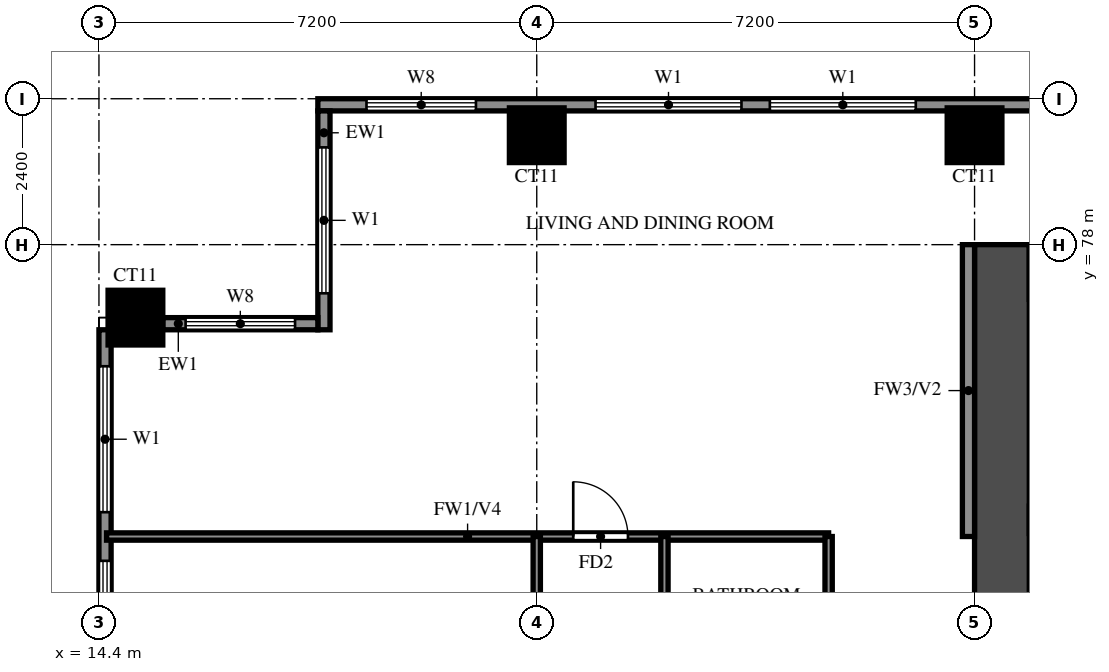
"""IFC4 building model, lengths in metres.
Left out: names, types, materials, properties, quantities, classifications, styles, units other than length and angle.
Written with IfcOpenShell. Run it as: python <this file> out.ifc"""

import sys

from ifc_helpers import new_model, si_unit, direction, frame, frame_2d, origin, origin_2d, place, context, subcontext, project, spatial, rectangle, extrude, source, transform, mapped, element, fill, save


model = new_model("IFC4")
c1 = context("Model", 3, precision=1e-05, world=origin(), true_north=direction((0.0, 1.0)))
c2 = subcontext(c1, "Body", "Model", "MODEL_VIEW")
j1 = project(units=[si_unit("LENGTHUNIT", "METRE"), si_unit("PLANEANGLEUNIT", "RADIAN")], contexts=[c1])
p1 = place(None, origin())
s1 = spatial("IfcSite", under=j1, at=p1, CompositionType="ELEMENT")
p2 = place(p1, origin())
s2 = spatial("IfcBuilding", under=s1, at=p2, CompositionType="ELEMENT")
p3 = place(p2, frame((0.0, 0.0, 97.0)))
s3 = spatial("IfcBuildingStorey", under=s2, at=p3, CompositionType="ELEMENT", Elevation=97.0)
m1 = source(origin(), c2, "Body", "SweptSolid", [
    extrude(rectangle(XDim=0.9, YDim=0.9, at=origin_2d()), origin(), (0.0, 0.0, 1.0), 3.18),
])
for number, where, z_axis, x_axis in (
    (1, (15.0, 76.8, 0.0), (0.0, 0.0, 1.0), (1.0, 0.0, 0.0)),
    (2, (21.6, 79.8, 0.0), (0.0, 0.0, 1.0), (1.0, 0.0, 0.0)),
    (3, (28.8, 79.8, 0.0), (0.0, 0.0, 1.0), (1.0, 0.0, 0.0)),
):
    element("IfcColumn", number, at=place(p3, frame(where, z_axis=z_axis, x_axis=x_axis)), inside=s3, PredefinedType="COLUMN", context=c2, shape_type="MappedRepresentation", body=[
        mapped(m1, transform((0.0, 0.0, 0.0))),
    ])
p4 = place(p3, frame((29.25, 66.0, 0.0), z_axis=(0.0, 0.0, 1.0), x_axis=(0.0, 1.0, 0.0)))
e4 = element("IfcWall", 4, at=p4, inside=s3, PredefinedType="SHEAR", context=c2, shape_type="SweptSolid", body=[
    extrude(rectangle(XDim=12.0, YDim=0.9, at=frame_2d((6.0, 0.0))), origin(), (0.0, 0.0, 1.0), 3.18),
])
p5 = place(p3, frame((29.7, 73.475, 0.0), z_axis=(0.0, 0.0, 1.0), x_axis=(1.0, 0.0, 0.0)))
e5 = element("IfcWall", 5, at=p5, inside=s3, PredefinedType="SHEAR", context=c2, shape_type="SweptSolid", body=[
    extrude(rectangle(XDim=3.175, YDim=0.45, at=frame_2d((1.587, 0.0))), origin(), (0.0, 0.0, 1.0), 3.18),
])
p6 = place(p3, frame((82.6, 80.3, 0.0), z_axis=(0.0, 0.0, 1.0), x_axis=(-1.0, 0.0, 0.0)))
e6 = element("IfcWall", 6, at=p6, inside=s3, PredefinedType="SOLIDWALL", context=c2, shape_type="SweptSolid", body=[
    extrude(rectangle(XDim=64.6, YDim=0.2, at=frame_2d((32.3, 0.0))), origin(), (0.0, 0.0, 1.0), 3.18),
])
p7 = place(p6, frame((4.3, 0.0, 0.0)))
e7 = element("IfcOpeningElement", 7, at=p7, cuts=e6, PredefinedType="OPENING", context=c2, shape_type="SweptSolid", body=[
    extrude(rectangle(XDim=1.8, YDim=2.4, at=frame_2d((0.9, 1.2))), frame((0.0, 0.11, 0.0), z_axis=(0.0, -1.0, 0.0), x_axis=(1.0, 0.0, 0.0)), (0.0, 0.0, 1.0), 0.22),
])
p8 = place(p6, frame((54.767, 0.0, 0.6)))
e8 = element("IfcOpeningElement", 8, at=p8, cuts=e6, PredefinedType="OPENING", context=c2, shape_type="SweptSolid", body=[
    extrude(rectangle(XDim=2.4, YDim=2.4, at=frame_2d((1.2, 1.2))), frame((0.0, 0.11, 0.0), z_axis=(0.0, -1.0, 0.0), x_axis=(1.0, 0.0, 0.0)), (0.0, 0.0, 1.0), 0.22),
])
p9 = place(p6, frame((57.633, 0.0, 0.6)))
e9 = element("IfcOpeningElement", 9, at=p9, cuts=e6, PredefinedType="OPENING", context=c2, shape_type="SweptSolid", body=[
    extrude(rectangle(XDim=2.4, YDim=2.4, at=frame_2d((1.2, 1.2))), frame((0.0, 0.11, 0.0), z_axis=(0.0, -1.0, 0.0), x_axis=(1.0, 0.0, 0.0)), (0.0, 0.0, 1.0), 0.22),
])
p10 = place(p6, frame((62.0, 0.0, 0.6)))
e10 = element("IfcOpeningElement", 10, at=p10, cuts=e6, PredefinedType="OPENING", context=c2, shape_type="SweptSolid", body=[
    extrude(rectangle(XDim=1.8, YDim=2.4, at=frame_2d((0.9, 1.2))), frame((0.0, 0.11, 0.0), z_axis=(0.0, -1.0, 0.0), x_axis=(1.0, 0.0, 0.0)), (0.0, 0.0, 1.0), 0.22),
])
p11 = place(p6, frame((1.7, 0.0, 0.6)))
e11 = element("IfcOpeningElement", 11, at=p11, cuts=e6, PredefinedType="OPENING", context=c2, shape_type="SweptSolid", body=[
    extrude(rectangle(XDim=1.2, YDim=2.4, at=frame_2d((0.6, 1.2))), frame((0.0, 0.11, 0.0), z_axis=(0.0, -1.0, 0.0), x_axis=(1.0, 0.0, 0.0)), (0.0, 0.0, 1.0), 0.22),
])
p12 = place(p6, frame((6.55, 0.0, 0.6)))
e12 = element("IfcOpeningElement", 12, at=p12, cuts=e6, PredefinedType="OPENING", context=c2, shape_type="SweptSolid", body=[
    extrude(rectangle(XDim=0.9, YDim=2.4, at=frame_2d((0.45, 1.2))), frame((0.0, 0.11, 0.0), z_axis=(0.0, -1.0, 0.0), x_axis=(1.0, 0.0, 0.0)), (0.0, 0.0, 1.0), 0.22),
])
p13 = place(p6, frame((8.3, 0.0, 0.6)))
e13 = element("IfcOpeningElement", 13, at=p13, cuts=e6, PredefinedType="OPENING", context=c2, shape_type="SweptSolid", body=[
    extrude(rectangle(XDim=1.8, YDim=2.4, at=frame_2d((0.9, 1.2))), frame((0.0, 0.11, 0.0), z_axis=(0.0, -1.0, 0.0), x_axis=(1.0, 0.0, 0.0)), (0.0, 0.0, 1.0), 0.22),
])
p14 = place(p3, frame((18.1, 80.2, 0.0), z_axis=(0.0, 0.0, 1.0), x_axis=(0.0, -1.0, 0.0)))
e14 = element("IfcWall", 14, at=p14, inside=s3, PredefinedType="SOLIDWALL", context=c2, shape_type="SweptSolid", body=[
    extrude(rectangle(XDim=3.6, YDim=0.2, at=frame_2d((1.8, 0.0))), origin(), (0.0, 0.0, 1.0), 3.18),
])
p15 = place(p14, frame((0.6, 0.0, 0.6)))
e15 = element("IfcOpeningElement", 15, at=p15, cuts=e14, PredefinedType="OPENING", context=c2, shape_type="SweptSolid", body=[
    extrude(rectangle(XDim=2.4, YDim=2.4, at=frame_2d((1.2, 1.2))), frame((0.0, 0.11, 0.0), z_axis=(0.0, -1.0, 0.0), x_axis=(1.0, 0.0, 0.0)), (0.0, 0.0, 1.0), 0.22),
])
p16 = place(p3, frame((18.0, 76.7, 0.0), z_axis=(0.0, 0.0, 1.0), x_axis=(-1.0, 0.0, 0.0)))
e16 = element("IfcWall", 16, at=p16, inside=s3, PredefinedType="SOLIDWALL", context=c2, shape_type="SweptSolid", body=[
    extrude(rectangle(XDim=2.55, YDim=0.2, at=frame_2d((1.275, 0.0))), origin(), (0.0, 0.0, 1.0), 3.18),
])
p17 = place(p16, frame((0.375, 0.0, 0.6)))
e17 = element("IfcOpeningElement", 17, at=p17, cuts=e16, PredefinedType="OPENING", context=c2, shape_type="SweptSolid", body=[
    extrude(rectangle(XDim=1.8, YDim=2.4, at=frame_2d((0.9, 1.2))), frame((0.0, 0.11, 0.0), z_axis=(0.0, -1.0, 0.0), x_axis=(1.0, 0.0, 0.0)), (0.0, 0.0, 1.0), 0.22),
])
p18 = place(p3, frame((14.5, 76.6, 0.0), z_axis=(0.0, 0.0, 1.0), x_axis=(0.0, -1.0, 0.0)))
e18 = element("IfcWall", 18, at=p18, inside=s3, PredefinedType="SOLIDWALL", context=c2, shape_type="SweptSolid", body=[
    extrude(rectangle(XDim=39.4, YDim=0.2, at=frame_2d((19.7, 0.0))), origin(), (0.0, 0.0, 1.0), 3.18),
])
p19 = place(p18, frame((25.9, 0.0, 0.0)))
e19 = element("IfcOpeningElement", 19, at=p19, cuts=e18, PredefinedType="OPENING", context=c2, shape_type="SweptSolid", body=[
    extrude(rectangle(XDim=1.8, YDim=2.4, at=frame_2d((0.9, 1.2))), frame((0.0, 0.11, 0.0), z_axis=(0.0, -1.0, 0.0), x_axis=(1.0, 0.0, 0.0)), (0.0, 0.0, 1.0), 0.22),
])
p20 = place(p18, frame((29.25, 0.0, 0.6)))
e20 = element("IfcOpeningElement", 20, at=p20, cuts=e18, PredefinedType="OPENING", context=c2, shape_type="SweptSolid", body=[
    extrude(rectangle(XDim=0.9, YDim=2.4, at=frame_2d((0.45, 1.2))), frame((0.0, 0.11, 0.0), z_axis=(0.0, -1.0, 0.0), x_axis=(1.0, 0.0, 0.0)), (0.0, 0.0, 1.0), 0.22),
])
p21 = place(p18, frame((32.0, 0.0, 0.6)))
e21 = element("IfcOpeningElement", 21, at=p21, cuts=e18, PredefinedType="OPENING", context=c2, shape_type="SweptSolid", body=[
    extrude(rectangle(XDim=2.4, YDim=2.4, at=frame_2d((1.2, 1.2))), frame((0.0, 0.11, 0.0), z_axis=(0.0, -1.0, 0.0), x_axis=(1.0, 0.0, 0.0)), (0.0, 0.0, 1.0), 0.22),
])
p22 = place(p18, frame((36.8, 0.0, 0.6)))
e22 = element("IfcOpeningElement", 22, at=p22, cuts=e18, PredefinedType="OPENING", context=c2, shape_type="SweptSolid", body=[
    extrude(rectangle(XDim=1.8, YDim=2.4, at=frame_2d((0.9, 1.2))), frame((0.0, 0.11, 0.0), z_axis=(0.0, -1.0, 0.0), x_axis=(1.0, 0.0, 0.0)), (0.0, 0.0, 1.0), 0.22),
])
p23 = place(p18, frame((22.2, 0.0, 0.6)))
e23 = element("IfcOpeningElement", 23, at=p23, cuts=e18, PredefinedType="OPENING", context=c2, shape_type="SweptSolid", body=[
    extrude(rectangle(XDim=1.2, YDim=2.4, at=frame_2d((0.6, 1.2))), frame((0.0, 0.11, 0.0), z_axis=(0.0, -1.0, 0.0), x_axis=(1.0, 0.0, 0.0)), (0.0, 0.0, 1.0), 0.22),
])
p24 = place(p18, frame((24.55, 0.0, 0.6)))
e24 = element("IfcOpeningElement", 24, at=p24, cuts=e18, PredefinedType="OPENING", context=c2, shape_type="SweptSolid", body=[
    extrude(rectangle(XDim=0.9, YDim=2.4, at=frame_2d((0.45, 1.2))), frame((0.0, 0.11, 0.0), z_axis=(0.0, -1.0, 0.0), x_axis=(1.0, 0.0, 0.0)), (0.0, 0.0, 1.0), 0.22),
])
p25 = place(p18, frame((18.2, 0.0, 0.6)))
e25 = element("IfcOpeningElement", 25, at=p25, cuts=e18, PredefinedType="OPENING", context=c2, shape_type="SweptSolid", body=[
    extrude(rectangle(XDim=2.4, YDim=2.4, at=frame_2d((1.2, 1.2))), frame((0.0, 0.11, 0.0), z_axis=(0.0, -1.0, 0.0), x_axis=(1.0, 0.0, 0.0)), (0.0, 0.0, 1.0), 0.22),
])
p26 = place(p18, frame((15.3, 0.0, 0.6)))
e26 = element("IfcOpeningElement", 26, at=p26, cuts=e18, PredefinedType="OPENING", context=c2, shape_type="SweptSolid", body=[
    extrude(rectangle(XDim=1.8, YDim=2.4, at=frame_2d((0.9, 1.2))), frame((0.0, 0.11, 0.0), z_axis=(0.0, -1.0, 0.0), x_axis=(1.0, 0.0, 0.0)), (0.0, 0.0, 1.0), 0.22),
])
p27 = place(p18, frame((11.75, 0.0, 1.5)))
e27 = element("IfcOpeningElement", 27, at=p27, cuts=e18, PredefinedType="OPENING", context=c2, shape_type="SweptSolid", body=[
    extrude(rectangle(XDim=0.9, YDim=0.9, at=frame_2d((0.45, 0.45))), frame((0.0, 0.11, 0.0), z_axis=(0.0, -1.0, 0.0), x_axis=(1.0, 0.0, 0.0)), (0.0, 0.0, 1.0), 0.22),
])
p28 = place(p18, frame((7.8, 0.0, 0.6)))
e28 = element("IfcOpeningElement", 28, at=p28, cuts=e18, PredefinedType="OPENING", context=c2, shape_type="SweptSolid", body=[
    extrude(rectangle(XDim=2.4, YDim=2.4, at=frame_2d((1.2, 1.2))), frame((0.0, 0.11, 0.0), z_axis=(0.0, -1.0, 0.0), x_axis=(1.0, 0.0, 0.0)), (0.0, 0.0, 1.0), 0.22),
])
p29 = place(p18, frame((3.8, 0.0, 0.6)))
e29 = element("IfcOpeningElement", 29, at=p29, cuts=e18, PredefinedType="OPENING", context=c2, shape_type="SweptSolid", body=[
    extrude(rectangle(XDim=2.4, YDim=2.4, at=frame_2d((1.2, 1.2))), frame((0.0, 0.11, 0.0), z_axis=(0.0, -1.0, 0.0), x_axis=(1.0, 0.0, 0.0)), (0.0, 0.0, 1.0), 0.22),
])
p30 = place(p18, frame((0.6, 0.0, 0.6)))
e30 = element("IfcOpeningElement", 30, at=p30, cuts=e18, PredefinedType="OPENING", context=c2, shape_type="SweptSolid", body=[
    extrude(rectangle(XDim=2.4, YDim=2.4, at=frame_2d((1.2, 1.2))), frame((0.0, 0.11, 0.0), z_axis=(0.0, -1.0, 0.0), x_axis=(1.0, 0.0, 0.0)), (0.0, 0.0, 1.0), 0.22),
])
p31 = place(p3, frame((28.7, 73.2, 0.0), z_axis=(0.0, 0.0, 1.0), x_axis=(0.0, 1.0, 0.0)))
e31 = element("IfcWall", 31, at=p31, inside=s3, PredefinedType="SOLIDWALL", context=c2, shape_type="SweptSolid", body=[
    extrude(rectangle(XDim=4.8, YDim=0.2, at=frame_2d((2.4, 0.0))), origin(), (0.0, 0.0, 1.0), 3.18),
])
p32 = place(p3, frame((14.525, 73.2, 0.0), z_axis=(0.0, 0.0, 1.0), x_axis=(1.0, 0.0, 0.0)))
e32 = element("IfcWall", 32, at=p32, inside=s3, PredefinedType="PARTITIONING", context=c2, shape_type="SweptSolid", body=[
    extrude(rectangle(XDim=11.875, YDim=0.12, at=frame_2d((5.938, 0.0))), origin(), (0.0, 0.0, 1.0), 2.28),
])
p33 = place(p32, frame((7.675, 0.0, 0.0)))
e33 = element("IfcOpeningElement", 33, at=p33, cuts=e32, PredefinedType="OPENING", context=c2, shape_type="SweptSolid", body=[
    extrude(rectangle(XDim=0.9, YDim=2.1, at=frame_2d((0.45, 1.05))), frame((0.0, 0.07, 0.0), z_axis=(0.0, -1.0, 0.0), x_axis=(1.0, 0.0, 0.0)), (0.0, 0.0, 1.0), 0.14),
])
p34 = place(p3, frame((21.6, 66.0, 0.0), z_axis=(0.0, 0.0, 1.0), x_axis=(0.0, 1.0, 0.0)))
e34 = element("IfcWall", 34, at=p34, inside=s3, PredefinedType="PARTITIONING", context=c2, shape_type="SweptSolid", body=[
    extrude(rectangle(XDim=7.2, YDim=0.12, at=frame_2d((3.6, 0.0))), origin(), (0.0, 0.0, 1.0), 3.18),
])
p35 = place(p34, frame((1.35, 0.0, 0.0)))
e35 = element("IfcOpeningElement", 35, at=p35, cuts=e34, PredefinedType="OPENING", context=c2, shape_type="SweptSolid", body=[
    extrude(rectangle(XDim=0.9, YDim=2.1, at=frame_2d((0.45, 1.05))), frame((0.0, 0.07, 0.0), z_axis=(0.0, -1.0, 0.0), x_axis=(1.0, 0.0, 0.0)), (0.0, 0.0, 1.0), 0.14),
])
p36 = place(p34, frame((4.95, 0.0, 0.0)))
e36 = element("IfcOpeningElement", 36, at=p36, cuts=e34, PredefinedType="OPENING", context=c2, shape_type="SweptSolid", body=[
    extrude(rectangle(XDim=0.9, YDim=2.1, at=frame_2d((0.45, 1.05))), frame((0.0, 0.07, 0.0), z_axis=(0.0, -1.0, 0.0), x_axis=(1.0, 0.0, 0.0)), (0.0, 0.0, 1.0), 0.14),
])
p37 = place(p3, frame((23.7, 61.2, 0.0), z_axis=(0.0, 0.0, 1.0), x_axis=(0.0, 1.0, 0.0)))
e37 = element("IfcWall", 37, at=p37, inside=s3, PredefinedType="PARTITIONING", context=c2, shape_type="SweptSolid", body=[
    extrude(rectangle(XDim=12.0, YDim=0.12, at=frame_2d((6.0, 0.0))), origin(), (0.0, 0.0, 1.0), 3.18),
])
p38 = place(p37, frame((1.875, 0.0, 0.0)))
e38 = element("IfcOpeningElement", 38, at=p38, cuts=e37, PredefinedType="OPENING", context=c2, shape_type="SweptSolid", body=[
    extrude(rectangle(XDim=0.9, YDim=2.1, at=frame_2d((0.45, 1.05))), frame((0.0, 0.07, 0.0), z_axis=(0.0, -1.0, 0.0), x_axis=(1.0, 0.0, 0.0)), (0.0, 0.0, 1.0), 0.14),
])
p39 = place(p37, frame((5.875, 0.0, 0.0)))
e39 = element("IfcOpeningElement", 39, at=p39, cuts=e37, PredefinedType="OPENING", context=c2, shape_type="SweptSolid", body=[
    extrude(rectangle(XDim=0.9, YDim=2.1, at=frame_2d((0.45, 1.05))), frame((0.0, 0.07, 0.0), z_axis=(0.0, -1.0, 0.0), x_axis=(1.0, 0.0, 0.0)), (0.0, 0.0, 1.0), 0.14),
])
p40 = place(p37, frame((9.6, 0.0, 0.0)))
e40 = element("IfcOpeningElement", 40, at=p40, cuts=e37, PredefinedType="OPENING", context=c2, shape_type="SweptSolid", body=[
    extrude(rectangle(XDim=0.8, YDim=2.1, at=frame_2d((0.4, 1.05))), frame((0.0, 0.07, 0.0), z_axis=(0.0, -1.0, 0.0), x_axis=(1.0, 0.0, 0.0)), (0.0, 0.0, 1.0), 0.14),
])
p41 = place(p3, frame((26.4, 69.2, 0.0), z_axis=(0.0, 0.0, 1.0), x_axis=(0.0, 1.0, 0.0)))
e41 = element("IfcWall", 41, at=p41, inside=s3, PredefinedType="PARTITIONING", context=c2, shape_type="SweptSolid", body=[
    extrude(rectangle(XDim=4.0, YDim=0.12, at=frame_2d((2.0, 0.0))), origin(), (0.0, 0.0, 1.0), 3.18),
])
p42 = place(p8, origin())
e42 = element("IfcWindow", 42, at=p42, inside=s3, PartitioningType="DOUBLE_PANEL_VERTICAL", PredefinedType="WINDOW", context=c2, shape_type="SweptSolid", body=[
    extrude(rectangle(XDim=2.4, YDim=2.4, at=frame_2d((1.2, 1.2))), frame((0.0, 0.03, 0.0), z_axis=(0.0, -1.0, 0.0), x_axis=(1.0, 0.0, 0.0)), (0.0, 0.0, 1.0), 0.06),
])
fill(e8, e42)
p43 = place(p9, origin())
e43 = element("IfcWindow", 43, at=p43, inside=s3, PartitioningType="DOUBLE_PANEL_VERTICAL", PredefinedType="WINDOW", context=c2, shape_type="SweptSolid", body=[
    extrude(rectangle(XDim=2.4, YDim=2.4, at=frame_2d((1.2, 1.2))), frame((0.0, 0.03, 0.0), z_axis=(0.0, -1.0, 0.0), x_axis=(1.0, 0.0, 0.0)), (0.0, 0.0, 1.0), 0.06),
])
fill(e9, e43)
p44 = place(p10, origin())
e44 = element("IfcWindow", 44, at=p44, inside=s3, PartitioningType="DOUBLE_PANEL_VERTICAL", PredefinedType="WINDOW", context=c2, shape_type="SweptSolid", body=[
    extrude(rectangle(XDim=1.8, YDim=2.4, at=frame_2d((0.9, 1.2))), frame((0.0, 0.03, 0.0), z_axis=(0.0, -1.0, 0.0), x_axis=(1.0, 0.0, 0.0)), (0.0, 0.0, 1.0), 0.06),
])
fill(e10, e44)
p45 = place(p15, origin())
e45 = element("IfcWindow", 45, at=p45, inside=s3, PartitioningType="DOUBLE_PANEL_VERTICAL", PredefinedType="WINDOW", context=c2, shape_type="SweptSolid", body=[
    extrude(rectangle(XDim=2.4, YDim=2.4, at=frame_2d((1.2, 1.2))), frame((0.0, 0.03, 0.0), z_axis=(0.0, -1.0, 0.0), x_axis=(1.0, 0.0, 0.0)), (0.0, 0.0, 1.0), 0.06),
])
fill(e15, e45)
p46 = place(p17, origin())
e46 = element("IfcWindow", 46, at=p46, inside=s3, PartitioningType="DOUBLE_PANEL_VERTICAL", PredefinedType="WINDOW", context=c2, shape_type="SweptSolid", body=[
    extrude(rectangle(XDim=1.8, YDim=2.4, at=frame_2d((0.9, 1.2))), frame((0.0, 0.03, 0.0), z_axis=(0.0, -1.0, 0.0), x_axis=(1.0, 0.0, 0.0)), (0.0, 0.0, 1.0), 0.06),
])
fill(e17, e46)
p47 = place(p29, origin())
e47 = element("IfcWindow", 47, at=p47, inside=s3, PartitioningType="DOUBLE_PANEL_VERTICAL", PredefinedType="WINDOW", context=c2, shape_type="SweptSolid", body=[
    extrude(rectangle(XDim=2.4, YDim=2.4, at=frame_2d((1.2, 1.2))), frame((0.0, 0.03, 0.0), z_axis=(0.0, -1.0, 0.0), x_axis=(1.0, 0.0, 0.0)), (0.0, 0.0, 1.0), 0.06),
])
fill(e29, e47)
p48 = place(p30, origin())
e48 = element("IfcWindow", 48, at=p48, inside=s3, PartitioningType="DOUBLE_PANEL_VERTICAL", PredefinedType="WINDOW", context=c2, shape_type="SweptSolid", body=[
    extrude(rectangle(XDim=2.4, YDim=2.4, at=frame_2d((1.2, 1.2))), frame((0.0, 0.03, 0.0), z_axis=(0.0, -1.0, 0.0), x_axis=(1.0, 0.0, 0.0)), (0.0, 0.0, 1.0), 0.06),
])
fill(e30, e48)
p49 = place(p33, origin())
e49 = element("IfcDoor", 49, at=p49, inside=s3, OperationType="SINGLE_SWING_LEFT", PredefinedType="DOOR", context=c2, shape_type="SweptSolid", body=[
    extrude(rectangle(XDim=0.9, YDim=2.1, at=frame_2d((0.45, 1.05))), frame((0.0, 0.025, 0.0), z_axis=(0.0, -1.0, 0.0), x_axis=(1.0, 0.0, 0.0)), (0.0, 0.0, 1.0), 0.05),
])
fill(e33, e49)
save(model, sys.argv[1])
